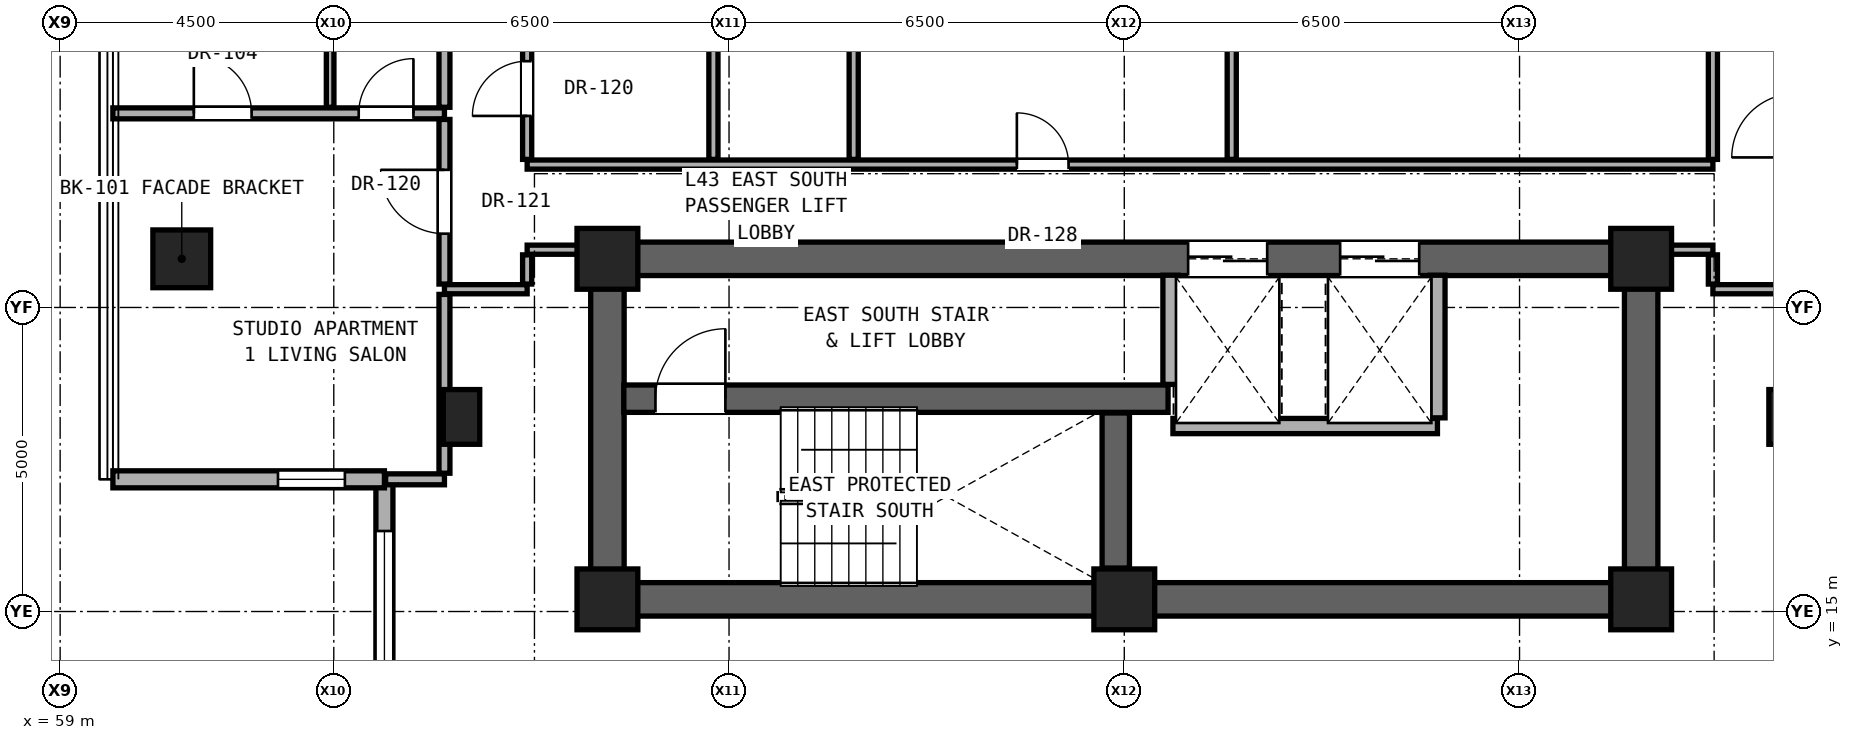
"""IFC4 building model, lengths in metres.
Left out: names, types, materials, properties, quantities, classifications, styles, units other than length and angle.
Written with IfcOpenShell. Run it as: python <this file> out.ifc"""

import sys

from ifc_helpers import new_model, si_unit, direction, frame, frame_2d, origin, origin_2d, place, context, subcontext, project, spatial, rectangle, hollow_rectangle, extrude, element, fill, save


model = new_model("IFC4")
c1 = context("Model", 3, precision=1e-05, world=origin(), true_north=direction((0.0, 1.0)))
c2 = subcontext(c1, "Body", "Model", "MODEL_VIEW")
j1 = project(units=[si_unit("LENGTHUNIT", "METRE"), si_unit("PLANEANGLEUNIT", "RADIAN")], contexts=[c1])
p1 = place(None, origin())
s1 = spatial("IfcSite", under=j1, at=p1, CompositionType="ELEMENT")
p2 = place(p1, origin())
s2 = spatial("IfcBuilding", under=s1, at=p2, CompositionType="ELEMENT")
p3 = place(p2, frame((0.0, 0.0, 154.4)))
s3 = spatial("IfcBuildingStorey", under=s2, at=p3, CompositionType="ELEMENT", Elevation=154.4)
for number, where, z_axis, x_axis in (
    (1, (68.0, 15.2, 0.0), (0.0, 0.0, 1.0), (1.0, 0.0, 0.0)),
    (2, (76.5, 15.2, 0.0), (0.0, 0.0, 1.0), (1.0, 0.0, 0.0)),
    (3, (85.0, 15.2, 0.0), (0.0, 0.0, 1.0), (1.0, 0.0, 0.0)),
    (4, (68.0, 20.8, 0.0), (0.0, 0.0, 1.0), (1.0, 0.0, 0.0)),
    (5, (85.0, 20.8, 0.0), (0.0, 0.0, 1.0), (1.0, 0.0, 0.0)),
):
    element("IfcColumn", number, at=place(p3, frame(where, z_axis=z_axis, x_axis=x_axis)), inside=s3, PredefinedType="COLUMN", context=c2, shape_type="SweptSolid", body=[
        extrude(rectangle(XDim=1.0, YDim=1.0, at=origin_2d()), origin(), (0.0, 0.0, 1.0), 3.25),
    ])
p4 = place(p3, frame((61.0, 20.8, 0.0), z_axis=(0.0, 0.0, 1.0), x_axis=(1.0, 0.0, 0.0)))
e6 = element("IfcColumn", 6, at=p4, inside=s3, PredefinedType="COLUMN", context=c2, shape_type="SweptSolid", body=[
    extrude(hollow_rectangle(XDim=0.95, YDim=0.95, WallThickness=0.05, at=origin_2d()), origin(), (0.0, 0.0, 1.0), 3.25),
])
for number, where, z_axis, x_axis in (
    (7, (65.6, 18.2, 0.0), (0.0, 0.0, 1.0), (1.0, 0.0, 0.0)),
    (8, (87.4, 18.2, 0.0), (0.0, 0.0, 1.0), (1.0, 0.0, 0.0)),
):
    element("IfcColumn", number, at=place(p3, frame(where, z_axis=z_axis, x_axis=x_axis)), inside=s3, PredefinedType="PILASTER", context=c2, shape_type="SweptSolid", body=[
        extrude(rectangle(XDim=0.6, YDim=0.9, at=origin_2d()), origin(), (0.0, 0.0, 1.0), 3.25),
    ])
p5 = place(p3, frame((68.0, 15.2, 0.0), z_axis=(0.0, 0.0, 1.0), x_axis=(1.0, 0.0, 0.0)))
e9 = element("IfcWall", 9, at=p5, inside=s3, PredefinedType="SHEAR", context=c2, shape_type="SweptSolid", body=[
    extrude(rectangle(XDim=17.0, YDim=0.55, at=frame_2d((8.5, 0.0))), origin(), (0.0, 0.0, 1.0), 3.05),
])
for number, where, z_axis, x_axis in (
    (10, (68.0, 15.2, 0.0), (0.0, 0.0, 1.0), (0.0, 1.0, 0.0)),
    (11, (85.0, 15.2, 0.0), (0.0, 0.0, 1.0), (0.0, 1.0, 0.0)),
):
    element("IfcWall", number, at=place(p3, frame(where, z_axis=z_axis, x_axis=x_axis)), inside=s3, PredefinedType="SHEAR", context=c2, shape_type="SweptSolid", body=[
        extrude(rectangle(XDim=5.6, YDim=0.55, at=frame_2d((2.8, 0.0))), origin(), (0.0, 0.0, 1.0), 3.05),
    ])
p6 = place(p3, frame((68.0, 20.8, 0.0), z_axis=(0.0, 0.0, 1.0), x_axis=(1.0, 0.0, 0.0)))
e12 = element("IfcWall", 12, at=p6, inside=s3, PredefinedType="SHEAR", context=c2, shape_type="SweptSolid", body=[
    extrude(rectangle(XDim=17.0, YDim=0.55, at=frame_2d((8.5, 0.0))), origin(), (0.0, 0.0, 1.0), 3.05),
])
p7 = place(p6, frame((9.55, 0.0, 0.0)))
e13 = element("IfcOpeningElement", 13, at=p7, cuts=e12, PredefinedType="OPENING", context=c2, shape_type="SweptSolid", body=[
    extrude(rectangle(XDim=1.3, YDim=2.3, at=frame_2d((0.65, 1.15))), frame((0.0, 0.285, 0.0), z_axis=(0.0, -1.0, 0.0), x_axis=(1.0, 0.0, 0.0)), (0.0, 0.0, 1.0), 0.57),
])
p8 = place(p6, frame((12.05, 0.0, 0.0)))
e14 = element("IfcOpeningElement", 14, at=p8, cuts=e12, PredefinedType="OPENING", context=c2, shape_type="SweptSolid", body=[
    extrude(rectangle(XDim=1.3, YDim=2.3, at=frame_2d((0.65, 1.15))), frame((0.0, 0.285, 0.0), z_axis=(0.0, -1.0, 0.0), x_axis=(1.0, 0.0, 0.0)), (0.0, 0.0, 1.0), 0.57),
])
p9 = place(p3, frame((64.333, 17.174, 0.0), z_axis=(0.0, 0.0, 1.0), x_axis=(0.0, -1.0, 0.0)))
e15 = element("IfcWall", 15, at=p9, inside=s3, PredefinedType="SOLIDWALL", context=c2, shape_type="SweptSolid", body=[
    extrude(rectangle(XDim=4.465, YDim=0.28, at=frame_2d((2.232, 0.0))), origin(), (0.0, 0.0, 1.0), 3.03),
])
p10 = place(p9, frame((0.85, 0.0, 0.53)))
e16 = element("IfcOpeningElement", 16, at=p10, cuts=e15, PredefinedType="OPENING", context=c2, shape_type="SweptSolid", body=[
    extrude(rectangle(XDim=2.4, YDim=2.35, at=frame_2d((1.2, 1.175))), frame((0.0, 0.15, 0.0), z_axis=(0.0, -1.0, 0.0), x_axis=(1.0, 0.0, 0.0)), (0.0, 0.0, 1.0), 0.3),
])
p11 = place(p3, frame((59.867, 17.174, 0.0), z_axis=(0.0, 0.0, 1.0), x_axis=(1.0, 0.0, 0.0)))
e17 = element("IfcWall", 17, at=p11, inside=s3, PredefinedType="SOLIDWALL", context=c2, shape_type="SweptSolid", body=[
    extrude(rectangle(XDim=4.465, YDim=0.28, at=frame_2d((2.233, 0.0))), origin(), (0.0, 0.0, 1.0), 3.03),
])
p12 = place(p11, frame((2.715, 0.0, 0.85)))
e18 = element("IfcOpeningElement", 18, at=p12, cuts=e17, PredefinedType="OPENING", context=c2, shape_type="SweptSolid", body=[
    extrude(rectangle(XDim=1.1, YDim=2.0, at=frame_2d((0.55, 1.0))), frame((0.0, 0.15, 0.0), z_axis=(0.0, -1.0, 0.0), x_axis=(1.0, 0.0, 0.0)), (0.0, 0.0, 1.0), 0.3),
])
p13 = place(p3, frame((64.353, 17.174, 0.0), z_axis=(0.0, 0.0, 1.0), x_axis=(1.0, 0.0, 0.0)))
e19 = element("IfcWall", 19, at=p13, inside=s3, PredefinedType="PARTITIONING", context=c2, shape_type="SweptSolid", body=[
    extrude(rectangle(XDim=0.967, YDim=0.18, at=frame_2d((0.484, 0.0))), origin(), (0.0, 0.0, 1.0), 3.05),
])
p14 = place(p3, frame((77.3, 18.05, 0.0), z_axis=(0.0, 0.0, 1.0), x_axis=(1.0, 0.0, 0.0)))
e20 = element("IfcWall", 20, at=p14, inside=s3, PredefinedType="SOLIDWALL", context=c2, shape_type="SweptSolid", body=[
    extrude(rectangle(XDim=4.35, YDim=0.25, at=frame_2d((2.175, 0.0))), origin(), (0.0, 0.0, 1.0), 3.05),
])
p15 = place(p3, frame((68.27, 18.5, 0.0), z_axis=(0.0, 0.0, 1.0), x_axis=(1.0, 0.0, 0.0)))
e21 = element("IfcWall", 21, at=p15, inside=s3, PredefinedType="SHEAR", context=c2, shape_type="SweptSolid", body=[
    extrude(rectangle(XDim=8.95, YDim=0.45, at=frame_2d((4.475, 0.0))), origin(), (0.0, 0.0, 1.0), 3.05),
])
p16 = place(p15, frame((0.52, 0.0, 0.0)))
e22 = element("IfcOpeningElement", 22, at=p16, cuts=e21, PredefinedType="OPENING", context=c2, shape_type="SweptSolid", body=[
    extrude(rectangle(XDim=1.15, YDim=2.2, at=frame_2d((0.575, 1.1))), frame((0.0, 0.235, 0.0), z_axis=(0.0, -1.0, 0.0), x_axis=(1.0, 0.0, 0.0)), (0.0, 0.0, 1.0), 0.47),
])
p17 = place(p3, frame((65.32, 20.3, 0.0), z_axis=(0.0, 0.0, 1.0), x_axis=(1.0, 0.0, 0.0)))
e23 = element("IfcWall", 23, at=p17, inside=s3, PredefinedType="PARTITIONING", context=c2, shape_type="SweptSolid", body=[
    extrude(rectangle(XDim=1.36, YDim=0.15, at=frame_2d((0.68, 0.0))), origin(), (0.0, 0.0, 1.0), 3.05),
])
p18 = place(p3, frame((86.18, 20.3, 0.0), z_axis=(0.0, 0.0, 1.0), x_axis=(1.0, 0.0, 0.0)))
e24 = element("IfcWall", 24, at=p18, inside=s3, PredefinedType="PARTITIONING", context=c2, shape_type="SweptSolid", body=[
    extrude(rectangle(XDim=1.36, YDim=0.15, at=frame_2d((0.68, 0.0))), origin(), (0.0, 0.0, 1.0), 3.05),
])
p19 = place(p3, frame((66.68, 20.95, 0.0), z_axis=(0.0, 0.0, 1.0), x_axis=(1.0, 0.0, 0.0)))
e25 = element("IfcWall", 25, at=p19, inside=s3, PredefinedType="PARTITIONING", context=c2, shape_type="SweptSolid", body=[
    extrude(rectangle(XDim=1.05, YDim=0.15, at=frame_2d((0.525, 0.0))), origin(), (0.0, 0.0, 1.0), 2.442),
])
p20 = place(p3, frame((85.27, 20.95, 0.0), z_axis=(0.0, 0.0, 1.0), x_axis=(1.0, 0.0, 0.0)))
e26 = element("IfcWall", 26, at=p20, inside=s3, PredefinedType="PARTITIONING", context=c2, shape_type="SweptSolid", body=[
    extrude(rectangle(XDim=0.91, YDim=0.15, at=frame_2d((0.455, 0.0))), origin(), (0.0, 0.0, 1.0), 2.442),
])
p21 = place(p3, frame((66.68, 22.35, 0.0), z_axis=(0.0, 0.0, 1.0), x_axis=(1.0, 0.0, 0.0)))
e27 = element("IfcWall", 27, at=p21, inside=s3, PredefinedType="PARTITIONING", context=c2, shape_type="SweptSolid", body=[
    extrude(rectangle(XDim=19.5, YDim=0.15, at=frame_2d((9.75, 0.0))), origin(), (0.0, 0.0, 1.0), 2.186),
])
p22 = place(p21, frame((8.053, 0.0, 0.0)))
e28 = element("IfcOpeningElement", 28, at=p22, cuts=e27, PredefinedType="OPENING", context=c2, shape_type="SweptSolid", body=[
    extrude(rectangle(XDim=0.85, YDim=2.01, at=frame_2d((0.425, 1.005))), frame((0.0, 0.085, 0.0), z_axis=(0.0, -1.0, 0.0), x_axis=(1.0, 0.0, 0.0)), (0.0, 0.0, 1.0), 0.17),
])
p23 = place(p3, frame((59.867, 23.192, 0.0), z_axis=(0.0, 0.0, 1.0), x_axis=(1.0, 0.0, 0.0)))
e29 = element("IfcWall", 29, at=p23, inside=s3, PredefinedType="PARTITIONING", context=c2, shape_type="SweptSolid", body=[
    extrude(rectangle(XDim=5.453, YDim=0.18, at=frame_2d((2.727, 0.0))), origin(), (0.0, 0.0, 1.0), 2.269),
])
p24 = place(p23, frame((1.332, 0.0, 0.0)))
e30 = element("IfcOpeningElement", 30, at=p24, cuts=e29, PredefinedType="OPENING", context=c2, shape_type="SweptSolid", body=[
    extrude(rectangle(XDim=0.95, YDim=2.15, at=frame_2d((0.475, 1.075))), frame((0.0, 0.1, 0.0), z_axis=(0.0, -1.0, 0.0), x_axis=(1.0, 0.0, 0.0)), (0.0, 0.0, 1.0), 0.2),
])
p25 = place(p23, frame((4.043, 0.0, 0.0)))
e31 = element("IfcOpeningElement", 31, at=p25, cuts=e29, PredefinedType="OPENING", context=c2, shape_type="SweptSolid", body=[
    extrude(rectangle(XDim=0.9, YDim=2.1, at=frame_2d((0.45, 1.05))), frame((0.0, 0.1, 0.0), z_axis=(0.0, -1.0, 0.0), x_axis=(1.0, 0.0, 0.0)), (0.0, 0.0, 1.0), 0.2),
])
p26 = place(p3, frame((63.44, 23.292, 0.0), z_axis=(0.0, 0.0, 1.0), x_axis=(0.0, 1.0, 0.0)))
e32 = element("IfcWall", 32, at=p26, inside=s3, PredefinedType="PARTITIONING", context=c2, shape_type="SweptSolid", body=[
    extrude(rectangle(XDim=2.115, YDim=0.125, at=frame_2d((1.058, 0.0))), origin(), (0.0, 0.0, 1.0), 3.05),
])
p27 = place(p3, frame((65.32, 17.274, 0.0), z_axis=(0.0, 0.0, 1.0), x_axis=(0.0, 1.0, 0.0)))
e33 = element("IfcWall", 33, at=p27, inside=s3, PredefinedType="PARTITIONING", context=c2, shape_type="SweptSolid", body=[
    extrude(rectangle(XDim=2.941, YDim=0.18, at=frame_2d((1.471, 0.0))), origin(), (0.0, 0.0, 1.0), 2.493),
])
p28 = place(p3, frame((65.32, 20.385, 0.0), z_axis=(0.0, 0.0, 1.0), x_axis=(0.0, 1.0, 0.0)))
e34 = element("IfcWall", 34, at=p28, inside=s3, PredefinedType="PARTITIONING", context=c2, shape_type="SweptSolid", body=[
    extrude(rectangle(XDim=2.707, YDim=0.18, at=frame_2d((1.354, 0.0))), origin(), (0.0, 0.0, 1.0), 2.442),
])
p29 = place(p28, frame((0.829, 0.0, 0.0)))
e35 = element("IfcOpeningElement", 35, at=p29, cuts=e34, PredefinedType="OPENING", context=c2, shape_type="SweptSolid", body=[
    extrude(rectangle(XDim=1.05, YDim=2.2, at=frame_2d((0.525, 1.1))), frame((0.0, 0.1, 0.0), z_axis=(0.0, -1.0, 0.0), x_axis=(1.0, 0.0, 0.0)), (0.0, 0.0, 1.0), 0.2),
])
p30 = place(p3, frame((65.32, 23.292, 0.0), z_axis=(0.0, 0.0, 1.0), x_axis=(0.0, 1.0, 0.0)))
e36 = element("IfcWall", 36, at=p30, inside=s3, PredefinedType="PARTITIONING", context=c2, shape_type="SweptSolid", body=[
    extrude(rectangle(XDim=2.115, YDim=0.18, at=frame_2d((1.058, 0.0))), origin(), (0.0, 0.0, 1.0), 3.05),
])
p31 = place(p3, frame((66.68, 20.385, 0.0), z_axis=(0.0, 0.0, 1.0), x_axis=(0.0, 1.0, 0.0)))
e37 = element("IfcWall", 37, at=p31, inside=s3, PredefinedType="PARTITIONING", context=c2, shape_type="SweptSolid", body=[
    extrude(rectangle(XDim=0.48, YDim=0.15, at=frame_2d((0.24, 0.0))), origin(), (0.0, 0.0, 1.0), 2.442),
])
p32 = place(p3, frame((66.68, 22.435, 0.0), z_axis=(0.0, 0.0, 1.0), x_axis=(0.0, 1.0, 0.0)))
e38 = element("IfcWall", 38, at=p32, inside=s3, PredefinedType="PARTITIONING", context=c2, shape_type="SweptSolid", body=[
    extrude(rectangle(XDim=2.33, YDim=0.15, at=frame_2d((1.165, 0.0))), origin(), (0.0, 0.0, 1.0), 3.05),
])
p33 = place(p32, frame((0.715, 0.0, 0.0)))
e39 = element("IfcOpeningElement", 39, at=p33, cuts=e38, PredefinedType="OPENING", context=c2, shape_type="SweptSolid", body=[
    extrude(rectangle(XDim=0.9, YDim=2.1, at=frame_2d((0.45, 1.05))), frame((0.0, 0.085, 0.0), z_axis=(0.0, -1.0, 0.0), x_axis=(1.0, 0.0, 0.0)), (0.0, 0.0, 1.0), 0.17),
])
p34 = place(p3, frame((69.743, 22.435, 0.0), z_axis=(0.0, 0.0, 1.0), x_axis=(0.0, 1.0, 0.0)))
e40 = element("IfcWall", 40, at=p34, inside=s3, PredefinedType="PARTITIONING", context=c2, shape_type="SweptSolid", body=[
    extrude(rectangle(XDim=2.33, YDim=0.15, at=frame_2d((1.165, 0.0))), origin(), (0.0, 0.0, 1.0), 3.05),
])
p35 = place(p3, frame((72.05, 22.435, 0.0), z_axis=(0.0, 0.0, 1.0), x_axis=(0.0, 1.0, 0.0)))
e41 = element("IfcWall", 41, at=p35, inside=s3, PredefinedType="PARTITIONING", context=c2, shape_type="SweptSolid", body=[
    extrude(rectangle(XDim=8.13, YDim=0.15, at=frame_2d((4.065, 0.0))), origin(), (0.0, 0.0, 1.0), 2.186),
])
p36 = place(p3, frame((76.36, 15.715, 0.0), z_axis=(0.0, 0.0, 1.0), x_axis=(0.0, 1.0, 0.0)))
e42 = element("IfcWall", 42, at=p36, inside=s3, PredefinedType="SHEAR", context=c2, shape_type="SweptSolid", body=[
    extrude(rectangle(XDim=2.55, YDim=0.45, at=frame_2d((1.275, 0.0))), origin(), (0.0, 0.0, 1.0), 3.05),
])
p37 = place(p3, frame((77.26, 18.735, 0.0), z_axis=(0.0, 0.0, 1.0), x_axis=(0.0, 1.0, 0.0)))
e43 = element("IfcWall", 43, at=p37, inside=s3, PredefinedType="SOLIDWALL", context=c2, shape_type="SweptSolid", body=[
    extrude(rectangle(XDim=1.795, YDim=0.25, at=frame_2d((0.897, 0.0))), origin(), (0.0, 0.0, 1.0), 3.05),
])
p38 = place(p3, frame((78.267, 22.435, 0.0), z_axis=(0.0, 0.0, 1.0), x_axis=(0.0, 1.0, 0.0)))
e44 = element("IfcWall", 44, at=p38, inside=s3, PredefinedType="PARTITIONING", context=c2, shape_type="SweptSolid", body=[
    extrude(rectangle(XDim=8.13, YDim=0.15, at=frame_2d((4.065, 0.0))), origin(), (0.0, 0.0, 1.0), 2.186),
])
p39 = place(p3, frame((81.65, 18.185, 0.0), z_axis=(0.0, 0.0, 1.0), x_axis=(0.0, 1.0, 0.0)))
e45 = element("IfcWall", 45, at=p39, inside=s3, PredefinedType="SOLIDWALL", context=c2, shape_type="SweptSolid", body=[
    extrude(rectangle(XDim=2.345, YDim=0.25, at=frame_2d((1.172, 0.0))), origin(), (0.0, 0.0, 1.0), 3.05),
])
p40 = place(p3, frame((86.18, 20.385, 0.0), z_axis=(0.0, 0.0, 1.0), x_axis=(0.0, 1.0, 0.0)))
e46 = element("IfcWall", 46, at=p40, inside=s3, PredefinedType="PARTITIONING", context=c2, shape_type="SweptSolid", body=[
    extrude(rectangle(XDim=0.48, YDim=0.15, at=frame_2d((0.24, 0.0))), origin(), (0.0, 0.0, 1.0), 2.442),
])
p41 = place(p3, frame((86.18, 22.435, 0.0), z_axis=(0.0, 0.0, 1.0), x_axis=(0.0, 1.0, 0.0)))
e47 = element("IfcWall", 47, at=p41, inside=s3, PredefinedType="PARTITIONING", context=c2, shape_type="SweptSolid", body=[
    extrude(rectangle(XDim=8.13, YDim=0.15, at=frame_2d((4.065, 0.0))), origin(), (0.0, 0.0, 1.0), 2.346),
])
p42 = place(p10, origin())
e48 = element("IfcWindow", 48, at=p42, inside=s3, PartitioningType="SINGLE_PANEL", PredefinedType="WINDOW", context=c2, shape_type="SweptSolid", body=[
    extrude(rectangle(XDim=2.4, YDim=2.35, at=frame_2d((1.2, 1.175))), frame((0.0, 0.03, 0.0), z_axis=(0.0, -1.0, 0.0), x_axis=(1.0, 0.0, 0.0)), (0.0, 0.0, 1.0), 0.06),
])
fill(e16, e48)
p43 = place(p12, origin())
e49 = element("IfcWindow", 49, at=p43, inside=s3, PartitioningType="SINGLE_PANEL", PredefinedType="WINDOW", context=c2, shape_type="SweptSolid", body=[
    extrude(rectangle(XDim=1.1, YDim=2.0, at=frame_2d((0.55, 1.0))), frame((0.0, 0.03, 0.0), z_axis=(0.0, -1.0, 0.0), x_axis=(1.0, 0.0, 0.0)), (0.0, 0.0, 1.0), 0.06),
])
fill(e18, e49)
p44 = place(p16, origin())
e50 = element("IfcDoor", 50, at=p44, inside=s3, OperationType="SINGLE_SWING_RIGHT", PredefinedType="DOOR", context=c2, shape_type="SweptSolid", body=[
    extrude(rectangle(XDim=1.15, YDim=2.2, at=frame_2d((0.575, 1.1))), frame((0.0, 0.025, 0.0), z_axis=(0.0, -1.0, 0.0), x_axis=(1.0, 0.0, 0.0)), (0.0, 0.0, 1.0), 0.05),
])
fill(e22, e50)
p45 = place(p33, origin())
e51 = element("IfcDoor", 51, at=p45, inside=s3, OperationType="SINGLE_SWING_LEFT", PredefinedType="DOOR", context=c2, shape_type="SweptSolid", body=[
    extrude(rectangle(XDim=0.9, YDim=2.1, at=frame_2d((0.45, 1.05))), frame((0.0, 0.025, 0.0), z_axis=(0.0, -1.0, 0.0), x_axis=(1.0, 0.0, 0.0)), (0.0, 0.0, 1.0), 0.05),
])
fill(e39, e51)
p46 = place(p29, origin())
e52 = element("IfcDoor", 52, at=p46, inside=s3, OperationType="SINGLE_SWING_RIGHT", PredefinedType="DOOR", context=c2, shape_type="SweptSolid", body=[
    extrude(rectangle(XDim=1.05, YDim=2.2, at=frame_2d((0.525, 1.1))), frame((0.0, 0.025, 0.0), z_axis=(0.0, -1.0, 0.0), x_axis=(1.0, 0.0, 0.0)), (0.0, 0.0, 1.0), 0.05),
])
fill(e35, e52)
p47 = place(p24, origin())
e53 = element("IfcDoor", 53, at=p47, inside=s3, OperationType="SINGLE_SWING_LEFT", PredefinedType="DOOR", context=c2, shape_type="SweptSolid", body=[
    extrude(rectangle(XDim=0.95, YDim=2.15, at=frame_2d((0.475, 1.075))), frame((0.0, 0.025, 0.0), z_axis=(0.0, -1.0, 0.0), x_axis=(1.0, 0.0, 0.0)), (0.0, 0.0, 1.0), 0.05),
])
fill(e30, e53)
p48 = place(p25, origin())
e54 = element("IfcDoor", 54, at=p48, inside=s3, OperationType="SINGLE_SWING_RIGHT", PredefinedType="DOOR", context=c2, shape_type="SweptSolid", body=[
    extrude(rectangle(XDim=0.9, YDim=2.1, at=frame_2d((0.45, 1.05))), frame((0.0, 0.025, 0.0), z_axis=(0.0, -1.0, 0.0), x_axis=(1.0, 0.0, 0.0)), (0.0, 0.0, 1.0), 0.05),
])
fill(e31, e54)
p49 = place(p22, origin())
e55 = element("IfcDoor", 55, at=p49, inside=s3, OperationType="SINGLE_SWING_LEFT", PredefinedType="DOOR", context=c2, shape_type="SweptSolid", body=[
    extrude(rectangle(XDim=0.85, YDim=2.01, at=frame_2d((0.425, 1.005))), frame((0.0, 0.025, 0.0), z_axis=(0.0, -1.0, 0.0), x_axis=(1.0, 0.0, 0.0)), (0.0, 0.0, 1.0), 0.05),
])
fill(e28, e55)
p50 = place(p7, origin())
e56 = element("IfcDoor", 56, at=p50, inside=s3, OperationType="DOUBLE_DOOR_SLIDING", PredefinedType="DOOR", context=c2, shape_type="SweptSolid", body=[
    extrude(rectangle(XDim=1.3, YDim=2.3, at=frame_2d((0.65, 1.15))), frame((0.0, 0.025, 0.0), z_axis=(0.0, -1.0, 0.0), x_axis=(1.0, 0.0, 0.0)), (0.0, 0.0, 1.0), 0.05),
])
fill(e13, e56)
p51 = place(p8, origin())
e57 = element("IfcDoor", 57, at=p51, inside=s3, OperationType="DOUBLE_DOOR_SLIDING", PredefinedType="DOOR", context=c2, shape_type="SweptSolid", body=[
    extrude(rectangle(XDim=1.3, YDim=2.3, at=frame_2d((0.65, 1.15))), frame((0.0, 0.025, 0.0), z_axis=(0.0, -1.0, 0.0), x_axis=(1.0, 0.0, 0.0)), (0.0, 0.0, 1.0), 0.05),
])
fill(e14, e57)
save(model, sys.argv[1])
